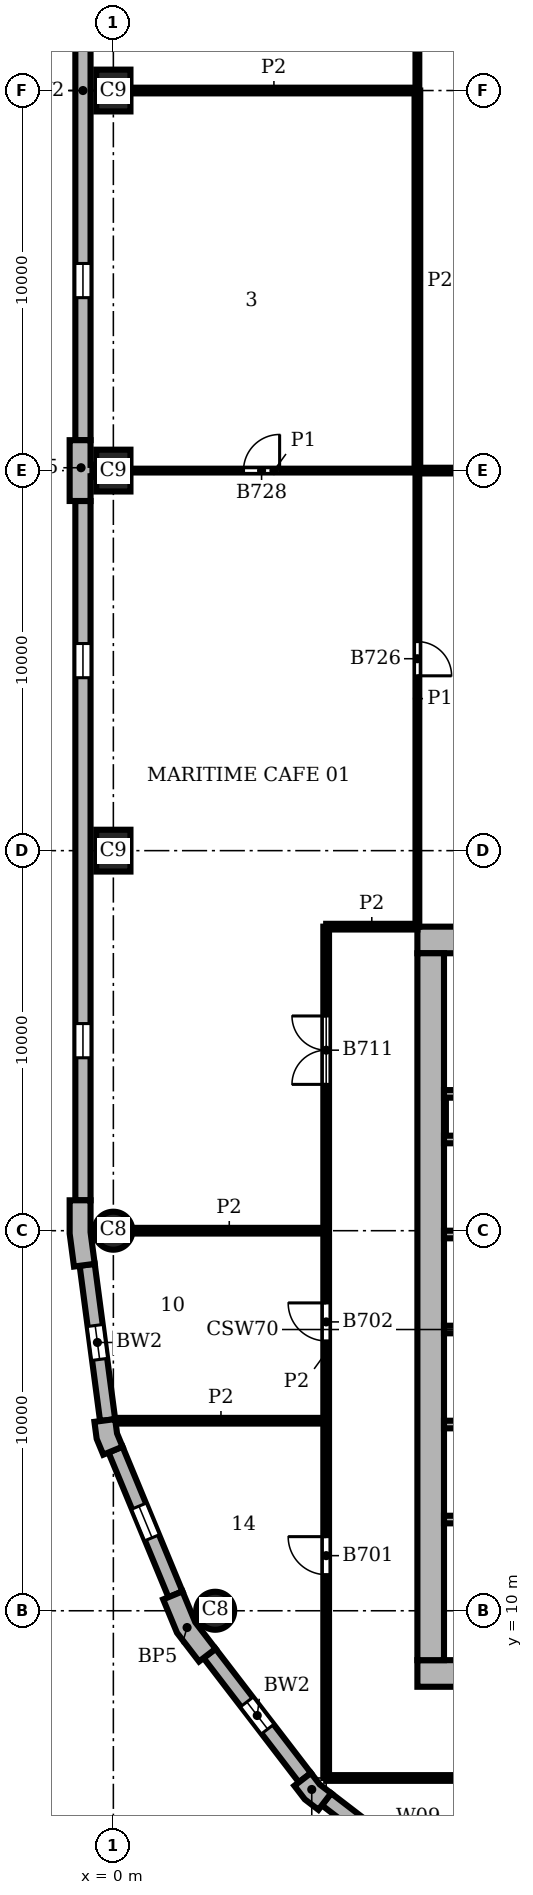
"""IFC4 building model, lengths in metres.
Left out: names, types, materials, properties, quantities, classifications, styles, units other than length and angle.
Written with IfcOpenShell. Run it as: python <this file> out.ifc"""

import sys

from ifc_helpers import new_model, si_unit, direction, frame, frame_2d, origin, origin_2d, place, context, subcontext, project, spatial, polyline, rectangle, circle, outline, extrude, element, fill, save


model = new_model("IFC4")
c1 = context("Model", 3, precision=1e-05, world=origin(), true_north=direction((0.0, 1.0)))
c2 = subcontext(c1, "Body", "Model", "MODEL_VIEW")
j1 = project(units=[si_unit("LENGTHUNIT", "METRE"), si_unit("PLANEANGLEUNIT", "RADIAN")], contexts=[c1])
p1 = place(None, origin())
s1 = spatial("IfcSite", under=j1, at=p1, CompositionType="ELEMENT")
p2 = place(p1, origin())
s2 = spatial("IfcBuilding", under=s1, at=p2, CompositionType="ELEMENT")
p3 = place(p2, frame((0.0, 0.0, 205.8)))
s3 = spatial("IfcBuildingStorey", under=s2, at=p3, CompositionType="ELEMENT", Elevation=205.8)
for number, where, z_axis, x_axis in (
    (1, (0.0, 50.0, 0.0), (0.0, 0.0, 1.0), (0.0, 1.0, 0.0)),
    (2, (0.0, 40.0, 0.0), (0.0, 0.0, 1.0), (0.0, 1.0, 0.0)),
    (3, (0.0, 30.0, 0.0), (0.0, 0.0, 1.0), (0.0, 1.0, 0.0)),
):
    element("IfcColumn", number, at=place(p3, frame(where, z_axis=z_axis, x_axis=x_axis)), inside=s3, PredefinedType="COLUMN", context=c2, shape_type="SweptSolid", body=[
        extrude(rectangle(XDim=1.1, YDim=0.9, at=origin_2d()), origin(), (0.0, 0.0, 1.0), 3.9),
    ])
for number, where, z_axis, x_axis in (
    (4, (0.0, 20.0, 0.0), (0.0, 0.0, 1.0), (1.0, 0.0, 0.0)),
    (5, (2.679, 10.0, 0.0), (0.0, 0.0, 1.0), (1.0, 0.0, 0.0)),
):
    element("IfcColumn", number, at=place(p3, frame(where, z_axis=z_axis, x_axis=x_axis)), inside=s3, PredefinedType="COLUMN", context=c2, shape_type="SweptSolid", body=[
        extrude(circle(Radius=0.5, at=origin_2d()), origin(), (0.0, 0.0, 1.0), 3.9),
    ])
for number, where, z_axis, x_axis in (
    (6, (8.0, 8.35, 0.0), (0.0, 0.0, 1.0), (1.0, 0.0, 0.0)),
    (7, (28.0, 27.65, 0.0), (0.0, 0.0, 1.0), (-1.0, 0.0, 0.0)),
):
    element("IfcWall", number, at=place(p3, frame(where, z_axis=z_axis, x_axis=x_axis)), inside=s3, PredefinedType="SHEAR", context=c2, shape_type="SweptSolid", body=[
        extrude(rectangle(XDim=20.0, YDim=0.7, at=frame_2d((10.0, 0.0))), origin(), (0.0, 0.0, 1.0), 3.9),
    ])
p4 = place(p3, frame((8.35, 27.3, 0.0), z_axis=(0.0, 0.0, 1.0), x_axis=(0.0, -1.0, 0.0)))
e8 = element("IfcWall", 8, at=p4, inside=s3, PredefinedType="SHEAR", context=c2, shape_type="SweptSolid", body=[
    extrude(rectangle(XDim=18.6, YDim=0.7, at=frame_2d((9.3, 0.0))), origin(), (0.0, 0.0, 1.0), 3.9),
])
p5 = place(p3, origin())
e9 = element("IfcWall", 9, at=p5, inside=s3, PredefinedType="SOLIDWALL", context=c2, shape_type="SweptSolid", body=[
    extrude(outline(polyline([(-0.6, 39.2), (-0.6, 39.85), (-0.55, 39.85), (-0.55, 40.15), (-0.6, 40.15), (-0.6, 40.8), (-1.0, 40.8), (-1.15, 40.8), (-1.15, 40.0), (-1.15, 39.2), (-1.0, 39.2), (-0.6, 39.2)])), origin(), (0.0, 0.0, 1.0), 3.9),
])
e10 = element("IfcWall", 10, at=p5, inside=s3, PredefinedType="SOLIDWALL", context=c2, shape_type="SweptSolid", body=[
    extrude(outline(polyline([(-1.0, 20.8), (-1.15, 20.8), (-1.15, 19.925), (-1.036, 19.057), (-0.887, 19.076), (-0.49, 19.128), (-0.6, 19.961), (-0.6, 20.8), (-1.0, 20.8)])), origin(), (0.0, 0.0, 1.0), 3.9),
])
e11 = element("IfcWall", 11, at=p5, inside=s3, PredefinedType="SOLIDWALL", context=c2, shape_type="SweptSolid", body=[
    extrude(outline(polyline([(-0.349, 14.99), (-0.498, 14.971), (-0.439, 14.523), (-0.266, 14.106), (-0.128, 14.164), (0.242, 14.317), (0.097, 14.667), (0.047, 15.043), (-0.349, 14.99)])), origin(), (0.0, 0.0, 1.0), 3.9),
])
e12 = element("IfcWall", 12, at=p5, inside=s3, PredefinedType="SOLIDWALL", context=c2, shape_type="SweptSolid", body=[
    extrude(outline(polyline([(1.449, 10.356), (1.311, 10.299), (1.675, 9.42), (2.254, 8.665), (2.373, 8.757), (2.69, 9.0), (2.155, 9.698), (1.819, 10.51), (1.449, 10.356)])), origin(), (0.0, 0.0, 1.0), 3.9),
])
e13 = element("IfcWall", 13, at=p5, inside=s3, PredefinedType="SOLIDWALL", context=c2, shape_type="SweptSolid", body=[
    extrude(outline(polyline([(4.882, 5.487), (4.763, 5.396), (5.038, 5.038), (5.396, 4.763), (5.487, 4.882), (5.731, 5.199), (5.43, 5.43), (5.199, 5.731), (4.882, 5.487)])), origin(), (0.0, 0.0, 1.0), 3.9),
])
p6 = place(p3, frame((-0.8, 59.2, 0.0), z_axis=(0.0, 0.0, 1.0), x_axis=(0.0, -1.0, 0.0)))
e14 = element("IfcWall", 14, at=p6, inside=s3, PredefinedType="SOLIDWALL", context=c2, shape_type="SweptSolid", body=[
    extrude(rectangle(XDim=18.4, YDim=0.4, at=frame_2d((9.2, 0.0))), origin(), (0.0, 0.0, 1.0), 3.9),
])
p7 = place(p6, frame((3.75, 0.0, 0.9)))
e15 = element("IfcOpeningElement", 15, at=p7, cuts=e14, PredefinedType="OPENING", context=c2, shape_type="SweptSolid", body=[
    extrude(rectangle(XDim=0.9, YDim=2.35, at=frame_2d((0.45, 1.175))), frame((0.0, 0.21, 0.0), z_axis=(0.0, -1.0, 0.0), x_axis=(1.0, 0.0, 0.0)), (0.0, 0.0, 1.0), 0.42),
])
p8 = place(p6, frame((13.75, 0.0, 0.9)))
e16 = element("IfcOpeningElement", 16, at=p8, cuts=e14, PredefinedType="OPENING", context=c2, shape_type="SweptSolid", body=[
    extrude(rectangle(XDim=0.9, YDim=2.35, at=frame_2d((0.45, 1.175))), frame((0.0, 0.21, 0.0), z_axis=(0.0, -1.0, 0.0), x_axis=(1.0, 0.0, 0.0)), (0.0, 0.0, 1.0), 0.42),
])
p9 = place(p3, frame((-0.8, 39.2, 0.0), z_axis=(0.0, 0.0, 1.0), x_axis=(0.0, -1.0, 0.0)))
e17 = element("IfcWall", 17, at=p9, inside=s3, PredefinedType="SOLIDWALL", context=c2, shape_type="SweptSolid", body=[
    extrude(rectangle(XDim=18.4, YDim=0.4, at=frame_2d((9.2, 0.0))), origin(), (0.0, 0.0, 1.0), 3.9),
])
p10 = place(p9, frame((3.75, 0.0, 0.9)))
e18 = element("IfcOpeningElement", 18, at=p10, cuts=e17, PredefinedType="OPENING", context=c2, shape_type="SweptSolid", body=[
    extrude(rectangle(XDim=0.9, YDim=2.35, at=frame_2d((0.45, 1.175))), frame((0.0, 0.21, 0.0), z_axis=(0.0, -1.0, 0.0), x_axis=(1.0, 0.0, 0.0)), (0.0, 0.0, 1.0), 0.42),
])
p11 = place(p9, frame((13.75, 0.0, 0.9)))
e19 = element("IfcOpeningElement", 19, at=p11, cuts=e17, PredefinedType="OPENING", context=c2, shape_type="SweptSolid", body=[
    extrude(rectangle(XDim=0.9, YDim=2.35, at=frame_2d((0.45, 1.175))), frame((0.0, 0.21, 0.0), z_axis=(0.0, -1.0, 0.0), x_axis=(1.0, 0.0, 0.0)), (0.0, 0.0, 1.0), 0.42),
])
p12 = place(p3, frame((-0.689, 19.102, 0.0), z_axis=(0.0, 0.0, 1.0), x_axis=(0.130514280502, -0.991446429508, 0.0)))
e20 = element("IfcWall", 20, at=p12, inside=s3, PredefinedType="SOLIDWALL", context=c2, shape_type="SweptSolid", body=[
    extrude(rectangle(XDim=4.121, YDim=0.4, at=frame_2d((2.061, 0.0))), origin(), (0.0, 0.0, 1.0), 3.9),
])
p13 = place(p12, frame((1.611, 0.0, 0.9)))
e21 = element("IfcOpeningElement", 21, at=p13, cuts=e20, PredefinedType="OPENING", context=c2, shape_type="SweptSolid", body=[
    extrude(rectangle(XDim=0.9, YDim=2.35, at=frame_2d((0.45, 1.175))), frame((0.0, 0.21, 0.0), z_axis=(0.0, -1.0, 0.0), x_axis=(1.0, 0.0, 0.0)), (0.0, 0.0, 1.0), 0.42),
])
p14 = place(p3, frame((0.057, 14.24, 0.0), z_axis=(0.0, 0.0, 1.0), x_axis=(0.382721546029, -0.923863744394, 0.0)))
e22 = element("IfcWall", 22, at=p14, inside=s3, PredefinedType="SOLIDWALL", context=c2, shape_type="SweptSolid", body=[
    extrude(rectangle(XDim=4.121, YDim=0.4, at=frame_2d((2.061, 0.0))), origin(), (0.0, 0.0, 1.0), 3.9),
])
p15 = place(p14, frame((1.611, 0.0, 0.9)))
e23 = element("IfcOpeningElement", 23, at=p15, cuts=e22, PredefinedType="OPENING", context=c2, shape_type="SweptSolid", body=[
    extrude(rectangle(XDim=0.9, YDim=2.35, at=frame_2d((0.45, 1.175))), frame((0.0, 0.21, 0.0), z_axis=(0.0, -1.0, 0.0), x_axis=(1.0, 0.0, 0.0)), (0.0, 0.0, 1.0), 0.42),
])
p16 = place(p3, frame((2.532, 8.878, 0.0), z_axis=(0.0, 0.0, 1.0), x_axis=(0.608759824817, -0.793354571229, 0.0)))
e24 = element("IfcWall", 24, at=p16, inside=s3, PredefinedType="SOLIDWALL", context=c2, shape_type="SweptSolid", body=[
    extrude(rectangle(XDim=4.121, YDim=0.4, at=frame_2d((2.061, 0.0))), origin(), (0.0, 0.0, 1.0), 3.9),
])
p17 = place(p16, frame((1.611, 0.0, 0.9)))
e25 = element("IfcOpeningElement", 25, at=p17, cuts=e24, PredefinedType="OPENING", context=c2, shape_type="SweptSolid", body=[
    extrude(rectangle(XDim=0.9, YDim=2.35, at=frame_2d((0.45, 1.175))), frame((0.0, 0.21, 0.0), z_axis=(0.0, -1.0, 0.0), x_axis=(1.0, 0.0, 0.0)), (0.0, 0.0, 1.0), 0.42),
])
p18 = place(p3, frame((5.609, 5.041, 0.0), z_axis=(0.0, 0.0, 1.0), x_axis=(0.793354571229, -0.608759824817, 0.0)))
e26 = element("IfcWall", 26, at=p18, inside=s3, PredefinedType="SOLIDWALL", context=c2, shape_type="SweptSolid", body=[
    extrude(rectangle(XDim=4.121, YDim=0.4, at=frame_2d((2.061, 0.0))), origin(), (0.0, 0.0, 1.0), 3.9),
])
p19 = place(p18, frame((1.611, 0.0, 0.9)))
e27 = element("IfcOpeningElement", 27, at=p19, cuts=e26, PredefinedType="OPENING", context=c2, shape_type="SweptSolid", body=[
    extrude(rectangle(XDim=0.9, YDim=2.35, at=frame_2d((0.45, 1.175))), frame((0.0, 0.21, 0.0), z_axis=(0.0, -1.0, 0.0), x_axis=(1.0, 0.0, 0.0)), (0.0, 0.0, 1.0), 0.42),
])
p20 = place(p3, frame((8.7, 12.4, 0.0), z_axis=(0.0, 0.0, 1.0), x_axis=(1.0, 0.0, 0.0)))
e28 = element("IfcWall", 28, at=p20, inside=s3, PredefinedType="SHEAR", context=c2, shape_type="SweptSolid", body=[
    extrude(rectangle(XDim=5.1, YDim=0.2, at=frame_2d((2.55, 0.0))), origin(), (0.0, 0.0, 1.0), 3.58),
])
for number, where, z_axis, x_axis in (
    (29, (8.7, 14.9, 0.0), (0.0, 0.0, 1.0), (1.0, 0.0, 0.0)),
    (30, (8.7, 17.4, 0.0), (0.0, 0.0, 1.0), (1.0, 0.0, 0.0)),
    (31, (8.7, 19.9, 0.0), (0.0, 0.0, 1.0), (1.0, 0.0, 0.0)),
    (32, (8.7, 22.4, 0.0), (0.0, 0.0, 1.0), (1.0, 0.0, 0.0)),
):
    element("IfcWall", number, at=place(p3, frame(where, z_axis=z_axis, x_axis=x_axis)), inside=s3, PredefinedType="SHEAR", context=c2, shape_type="SweptSolid", body=[
        extrude(rectangle(XDim=3.0, YDim=0.2, at=frame_2d((1.5, 0.0))), origin(), (0.0, 0.0, 1.0), 3.58),
    ])
p21 = place(p3, frame((8.7, 23.6, 0.0), z_axis=(0.0, 0.0, 1.0), x_axis=(1.0, 0.0, 0.0)))
e33 = element("IfcWall", 33, at=p21, inside=s3, PredefinedType="SHEAR", context=c2, shape_type="SweptSolid", body=[
    extrude(rectangle(XDim=5.1, YDim=0.2, at=frame_2d((2.55, 0.0))), origin(), (0.0, 0.0, 1.0), 3.58),
])
p22 = place(p3, frame((8.0, 28.0, 0.0), z_axis=(0.0, 0.0, 1.0), x_axis=(0.0, 1.0, 0.0)))
e34 = element("IfcWall", 34, at=p22, inside=s3, PredefinedType="PARTITIONING", context=c2, shape_type="SweptSolid", body=[
    extrude(rectangle(XDim=12.0, YDim=0.1, at=frame_2d((6.0, 0.0))), origin(), (0.0, 0.0, 1.0), 3.58),
])
p23 = place(p22, frame((6.6, 0.0, 0.0)))
e35 = element("IfcOpeningElement", 35, at=p23, cuts=e34, PredefinedType="OPENING", context=c2, shape_type="SweptSolid", body=[
    extrude(rectangle(XDim=0.9, YDim=2.1, at=frame_2d((0.45, 1.05))), frame((0.0, 0.06, 0.0), z_axis=(0.0, -1.0, 0.0), x_axis=(1.0, 0.0, 0.0)), (0.0, 0.0, 1.0), 0.12),
])
p24 = place(p3, frame((8.0, 50.0, 0.0), z_axis=(0.0, 0.0, 1.0), x_axis=(0.0, 1.0, 0.0)))
e36 = element("IfcWall", 36, at=p24, inside=s3, PredefinedType="PARTITIONING", context=c2, shape_type="SweptSolid", body=[
    extrude(rectangle(XDim=2.5, YDim=0.1, at=frame_2d((1.25, 0.0))), origin(), (0.0, 0.0, 1.0), 3.58),
])
p25 = place(p3, frame((0.45, 40.0, 0.0), z_axis=(0.0, 0.0, 1.0), x_axis=(1.0, 0.0, 0.0)))
e37 = element("IfcWall", 37, at=p25, inside=s3, PredefinedType="PARTITIONING", context=c2, shape_type="SweptSolid", body=[
    extrude(rectangle(XDim=7.55, YDim=0.1, at=frame_2d((3.775, 0.0))), origin(), (0.0, 0.0, 1.0), 3.58),
])
p26 = place(p25, frame((2.975, 0.0, 0.0)))
e38 = element("IfcOpeningElement", 38, at=p26, cuts=e37, PredefinedType="OPENING", context=c2, shape_type="SweptSolid", body=[
    extrude(rectangle(XDim=0.95, YDim=2.1, at=frame_2d((0.475, 1.05))), frame((0.0, 0.06, 0.0), z_axis=(0.0, -1.0, 0.0), x_axis=(1.0, 0.0, 0.0)), (0.0, 0.0, 1.0), 0.12),
])
p27 = place(p3, frame((5.6, 5.6, 0.0), z_axis=(0.0, 0.0, 1.0), x_axis=(0.0, 1.0, 0.0)))
e39 = element("IfcWall", 39, at=p27, inside=s3, PredefinedType="PARTITIONING", context=c2, shape_type="SweptSolid", body=[
    extrude(rectangle(XDim=22.4, YDim=0.15, at=frame_2d((11.2, 0.0))), origin(), (0.0, 0.0, 1.0), 3.58),
])
p28 = place(p27, frame((5.35, 0.0, 0.0)))
e40 = element("IfcOpeningElement", 40, at=p28, cuts=e39, PredefinedType="OPENING", context=c2, shape_type="SweptSolid", body=[
    extrude(rectangle(XDim=1.0, YDim=2.1, at=frame_2d((0.5, 1.05))), frame((0.0, 0.085, 0.0), z_axis=(0.0, -1.0, 0.0), x_axis=(1.0, 0.0, 0.0)), (0.0, 0.0, 1.0), 0.17),
])
p29 = place(p27, frame((11.5, 0.0, 0.0)))
e41 = element("IfcOpeningElement", 41, at=p29, cuts=e39, PredefinedType="OPENING", context=c2, shape_type="SweptSolid", body=[
    extrude(rectangle(XDim=1.0, YDim=2.1, at=frame_2d((0.5, 1.05))), frame((0.0, 0.085, 0.0), z_axis=(0.0, -1.0, 0.0), x_axis=(1.0, 0.0, 0.0)), (0.0, 0.0, 1.0), 0.17),
])
p30 = place(p27, frame((18.25, 0.0, 0.0)))
e42 = element("IfcOpeningElement", 42, at=p30, cuts=e39, PredefinedType="OPENING", context=c2, shape_type="SweptSolid", body=[
    extrude(rectangle(XDim=1.8, YDim=2.1, at=frame_2d((0.9, 1.05))), frame((0.0, 0.085, 0.0), z_axis=(0.0, -1.0, 0.0), x_axis=(1.0, 0.0, 0.0)), (0.0, 0.0, 1.0), 0.17),
])
p31 = place(p3, frame((8.0, 40.0, 0.0), z_axis=(0.0, 0.0, 1.0), x_axis=(0.0, 1.0, 0.0)))
e43 = element("IfcWall", 43, at=p31, inside=s3, PredefinedType="PARTITIONING", context=c2, shape_type="SweptSolid", body=[
    extrude(rectangle(XDim=10.0, YDim=0.15, at=frame_2d((5.0, 0.0))), origin(), (0.0, 0.0, 1.0), 3.58),
])
p32 = place(p3, frame((5.6, 5.6, 0.0), z_axis=(0.0, 0.0, 1.0), x_axis=(1.0, 0.0, 0.0)))
e44 = element("IfcWall", 44, at=p32, inside=s3, PredefinedType="PARTITIONING", context=c2, shape_type="SweptSolid", body=[
    extrude(rectangle(XDim=25.4, YDim=0.15, at=frame_2d((12.7, 0.0))), origin(), (0.0, 0.0, 1.0), 3.58),
])
p33 = place(p32, frame((5.35, 0.0, 0.0)))
e45 = element("IfcOpeningElement", 45, at=p33, cuts=e44, PredefinedType="OPENING", context=c2, shape_type="SweptSolid", body=[
    extrude(rectangle(XDim=1.0, YDim=2.1, at=frame_2d((0.5, 1.05))), frame((0.0, 0.085, 0.0), z_axis=(0.0, -1.0, 0.0), x_axis=(1.0, 0.0, 0.0)), (0.0, 0.0, 1.0), 0.17),
])
p34 = place(p32, frame((11.25, 0.0, 0.0)))
e46 = element("IfcOpeningElement", 46, at=p34, cuts=e44, PredefinedType="OPENING", context=c2, shape_type="SweptSolid", body=[
    extrude(rectangle(XDim=1.0, YDim=2.1, at=frame_2d((0.5, 1.05))), frame((0.0, 0.085, 0.0), z_axis=(0.0, -1.0, 0.0), x_axis=(1.0, 0.0, 0.0)), (0.0, 0.0, 1.0), 0.17),
])
p35 = place(p32, frame((18.75, 0.0, 0.0)))
e47 = element("IfcOpeningElement", 47, at=p35, cuts=e44, PredefinedType="OPENING", context=c2, shape_type="SweptSolid", body=[
    extrude(rectangle(XDim=1.0, YDim=2.1, at=frame_2d((0.5, 1.05))), frame((0.0, 0.085, 0.0), z_axis=(0.0, -1.0, 0.0), x_axis=(1.0, 0.0, 0.0)), (0.0, 0.0, 1.0), 0.17),
])
p36 = place(p3, frame((0.063, 15.0, 0.0), z_axis=(0.0, 0.0, 1.0), x_axis=(1.0, 0.0, 0.0)))
e48 = element("IfcWall", 48, at=p36, inside=s3, PredefinedType="PARTITIONING", context=c2, shape_type="SweptSolid", body=[
    extrude(rectangle(XDim=5.537, YDim=0.15, at=frame_2d((2.769, 0.0))), origin(), (0.0, 0.0, 1.0), 3.58),
])
p37 = place(p3, frame((0.5, 20.0, 0.0), z_axis=(0.0, 0.0, 1.0), x_axis=(1.0, 0.0, 0.0)))
e49 = element("IfcWall", 49, at=p37, inside=s3, PredefinedType="PARTITIONING", context=c2, shape_type="SweptSolid", body=[
    extrude(rectangle(XDim=5.1, YDim=0.15, at=frame_2d((2.55, 0.0))), origin(), (0.0, 0.0, 1.0), 3.58),
])
p38 = place(p3, frame((5.6, 28.0, 0.0), z_axis=(0.0, 0.0, 1.0), x_axis=(1.0, 0.0, 0.0)))
e50 = element("IfcWall", 50, at=p38, inside=s3, PredefinedType="PARTITIONING", context=c2, shape_type="SweptSolid", body=[
    extrude(rectangle(XDim=2.4, YDim=0.15, at=frame_2d((1.2, 0.0))), origin(), (0.0, 0.0, 1.0), 3.58),
])
p39 = place(p3, frame((8.0, 40.0, 0.0), z_axis=(0.0, 0.0, 1.0), x_axis=(1.0, 0.0, 0.0)))
e51 = element("IfcWall", 51, at=p39, inside=s3, PredefinedType="PARTITIONING", context=c2, shape_type="SweptSolid", body=[
    extrude(rectangle(XDim=1.35, YDim=0.15, at=frame_2d((0.675, 0.0))), origin(), (0.0, 0.0, 1.0), 3.58),
])
p40 = place(p3, frame((0.45, 50.0, 0.0), z_axis=(0.0, 0.0, 1.0), x_axis=(1.0, 0.0, 0.0)))
e52 = element("IfcWall", 52, at=p40, inside=s3, PredefinedType="PARTITIONING", context=c2, shape_type="SweptSolid", body=[
    extrude(rectangle(XDim=7.55, YDim=0.15, at=frame_2d((3.775, 0.0))), origin(), (0.0, 0.0, 1.0), 3.58),
])
p41 = place(p8, origin())
e53 = element("IfcWindow", 53, at=p41, inside=s3, PartitioningType="SINGLE_PANEL", PredefinedType="WINDOW", context=c2, shape_type="SweptSolid", body=[
    extrude(rectangle(XDim=0.9, YDim=2.35, at=frame_2d((0.45, 1.175))), frame((0.0, 0.16, 0.0), z_axis=(0.0, -1.0, 0.0), x_axis=(1.0, 0.0, 0.0)), (0.0, 0.0, 1.0), 0.06),
])
fill(e16, e53)
p42 = place(p10, origin())
e54 = element("IfcWindow", 54, at=p42, inside=s3, PartitioningType="SINGLE_PANEL", PredefinedType="WINDOW", context=c2, shape_type="SweptSolid", body=[
    extrude(rectangle(XDim=0.9, YDim=2.35, at=frame_2d((0.45, 1.175))), frame((0.0, 0.16, 0.0), z_axis=(0.0, -1.0, 0.0), x_axis=(1.0, 0.0, 0.0)), (0.0, 0.0, 1.0), 0.06),
])
fill(e18, e54)
p43 = place(p11, origin())
e55 = element("IfcWindow", 55, at=p43, inside=s3, PartitioningType="SINGLE_PANEL", PredefinedType="WINDOW", context=c2, shape_type="SweptSolid", body=[
    extrude(rectangle(XDim=0.9, YDim=2.35, at=frame_2d((0.45, 1.175))), frame((0.0, 0.16, 0.0), z_axis=(0.0, -1.0, 0.0), x_axis=(1.0, 0.0, 0.0)), (0.0, 0.0, 1.0), 0.06),
])
fill(e19, e55)
p44 = place(p13, origin())
e56 = element("IfcWindow", 56, at=p44, inside=s3, PartitioningType="SINGLE_PANEL", PredefinedType="WINDOW", context=c2, shape_type="SweptSolid", body=[
    extrude(rectangle(XDim=0.9, YDim=2.35, at=frame_2d((0.45, 1.175))), frame((0.0, 0.16, 0.0), z_axis=(0.0, -1.0, 0.0), x_axis=(1.0, 0.0, 0.0)), (0.0, 0.0, 1.0), 0.06),
])
fill(e21, e56)
p45 = place(p15, origin())
e57 = element("IfcWindow", 57, at=p45, inside=s3, PartitioningType="SINGLE_PANEL", PredefinedType="WINDOW", context=c2, shape_type="SweptSolid", body=[
    extrude(rectangle(XDim=0.9, YDim=2.35, at=frame_2d((0.45, 1.175))), frame((0.0, 0.16, 0.0), z_axis=(0.0, -1.0, 0.0), x_axis=(1.0, 0.0, 0.0)), (0.0, 0.0, 1.0), 0.06),
])
fill(e23, e57)
p46 = place(p17, origin())
e58 = element("IfcWindow", 58, at=p46, inside=s3, PartitioningType="SINGLE_PANEL", PredefinedType="WINDOW", context=c2, shape_type="SweptSolid", body=[
    extrude(rectangle(XDim=0.9, YDim=2.35, at=frame_2d((0.45, 1.175))), frame((0.0, 0.16, 0.0), z_axis=(0.0, -1.0, 0.0), x_axis=(1.0, 0.0, 0.0)), (0.0, 0.0, 1.0), 0.06),
])
fill(e25, e58)
p47 = place(p28, origin())
e59 = element("IfcDoor", 59, at=p47, inside=s3, OperationType="SINGLE_SWING_RIGHT", PredefinedType="DOOR", context=c2, shape_type="SweptSolid", body=[
    extrude(rectangle(XDim=1.0, YDim=2.1, at=frame_2d((0.5, 1.05))), frame((0.0, 0.025, 0.0), z_axis=(0.0, -1.0, 0.0), x_axis=(1.0, 0.0, 0.0)), (0.0, 0.0, 1.0), 0.05),
])
fill(e40, e59)
p48 = place(p29, origin())
e60 = element("IfcDoor", 60, at=p48, inside=s3, OperationType="SINGLE_SWING_RIGHT", PredefinedType="DOOR", context=c2, shape_type="SweptSolid", body=[
    extrude(rectangle(XDim=1.0, YDim=2.1, at=frame_2d((0.5, 1.05))), frame((0.0, 0.025, 0.0), z_axis=(0.0, -1.0, 0.0), x_axis=(1.0, 0.0, 0.0)), (0.0, 0.0, 1.0), 0.05),
])
fill(e41, e60)
p49 = place(p30, origin())
e61 = element("IfcDoor", 61, at=p49, inside=s3, OperationType="DOUBLE_DOOR_SINGLE_SWING", PredefinedType="DOOR", context=c2, shape_type="SweptSolid", body=[
    extrude(rectangle(XDim=1.8, YDim=2.1, at=frame_2d((0.9, 1.05))), frame((0.0, 0.025, 0.0), z_axis=(0.0, -1.0, 0.0), x_axis=(1.0, 0.0, 0.0)), (0.0, 0.0, 1.0), 0.05),
])
fill(e42, e61)
p50 = place(p23, frame((0.9, 0.0, 0.0), z_axis=(0.0, 0.0, 1.0), x_axis=(-1.0, 0.0, 0.0)))
e62 = element("IfcDoor", 62, at=p50, inside=s3, OperationType="SINGLE_SWING_RIGHT", PredefinedType="DOOR", context=c2, shape_type="SweptSolid", body=[
    extrude(rectangle(XDim=0.9, YDim=2.1, at=frame_2d((0.45, 1.05))), frame((0.0, 0.025, 0.0), z_axis=(0.0, -1.0, 0.0), x_axis=(1.0, 0.0, 0.0)), (0.0, 0.0, 1.0), 0.05),
])
fill(e35, e62)
p51 = place(p26, origin())
e63 = element("IfcDoor", 63, at=p51, inside=s3, OperationType="SINGLE_SWING_RIGHT", PredefinedType="DOOR", context=c2, shape_type="SweptSolid", body=[
    extrude(rectangle(XDim=0.95, YDim=2.1, at=frame_2d((0.475, 1.05))), frame((0.0, 0.025, 0.0), z_axis=(0.0, -1.0, 0.0), x_axis=(1.0, 0.0, 0.0)), (0.0, 0.0, 1.0), 0.05),
])
fill(e38, e63)
save(model, sys.argv[1])
